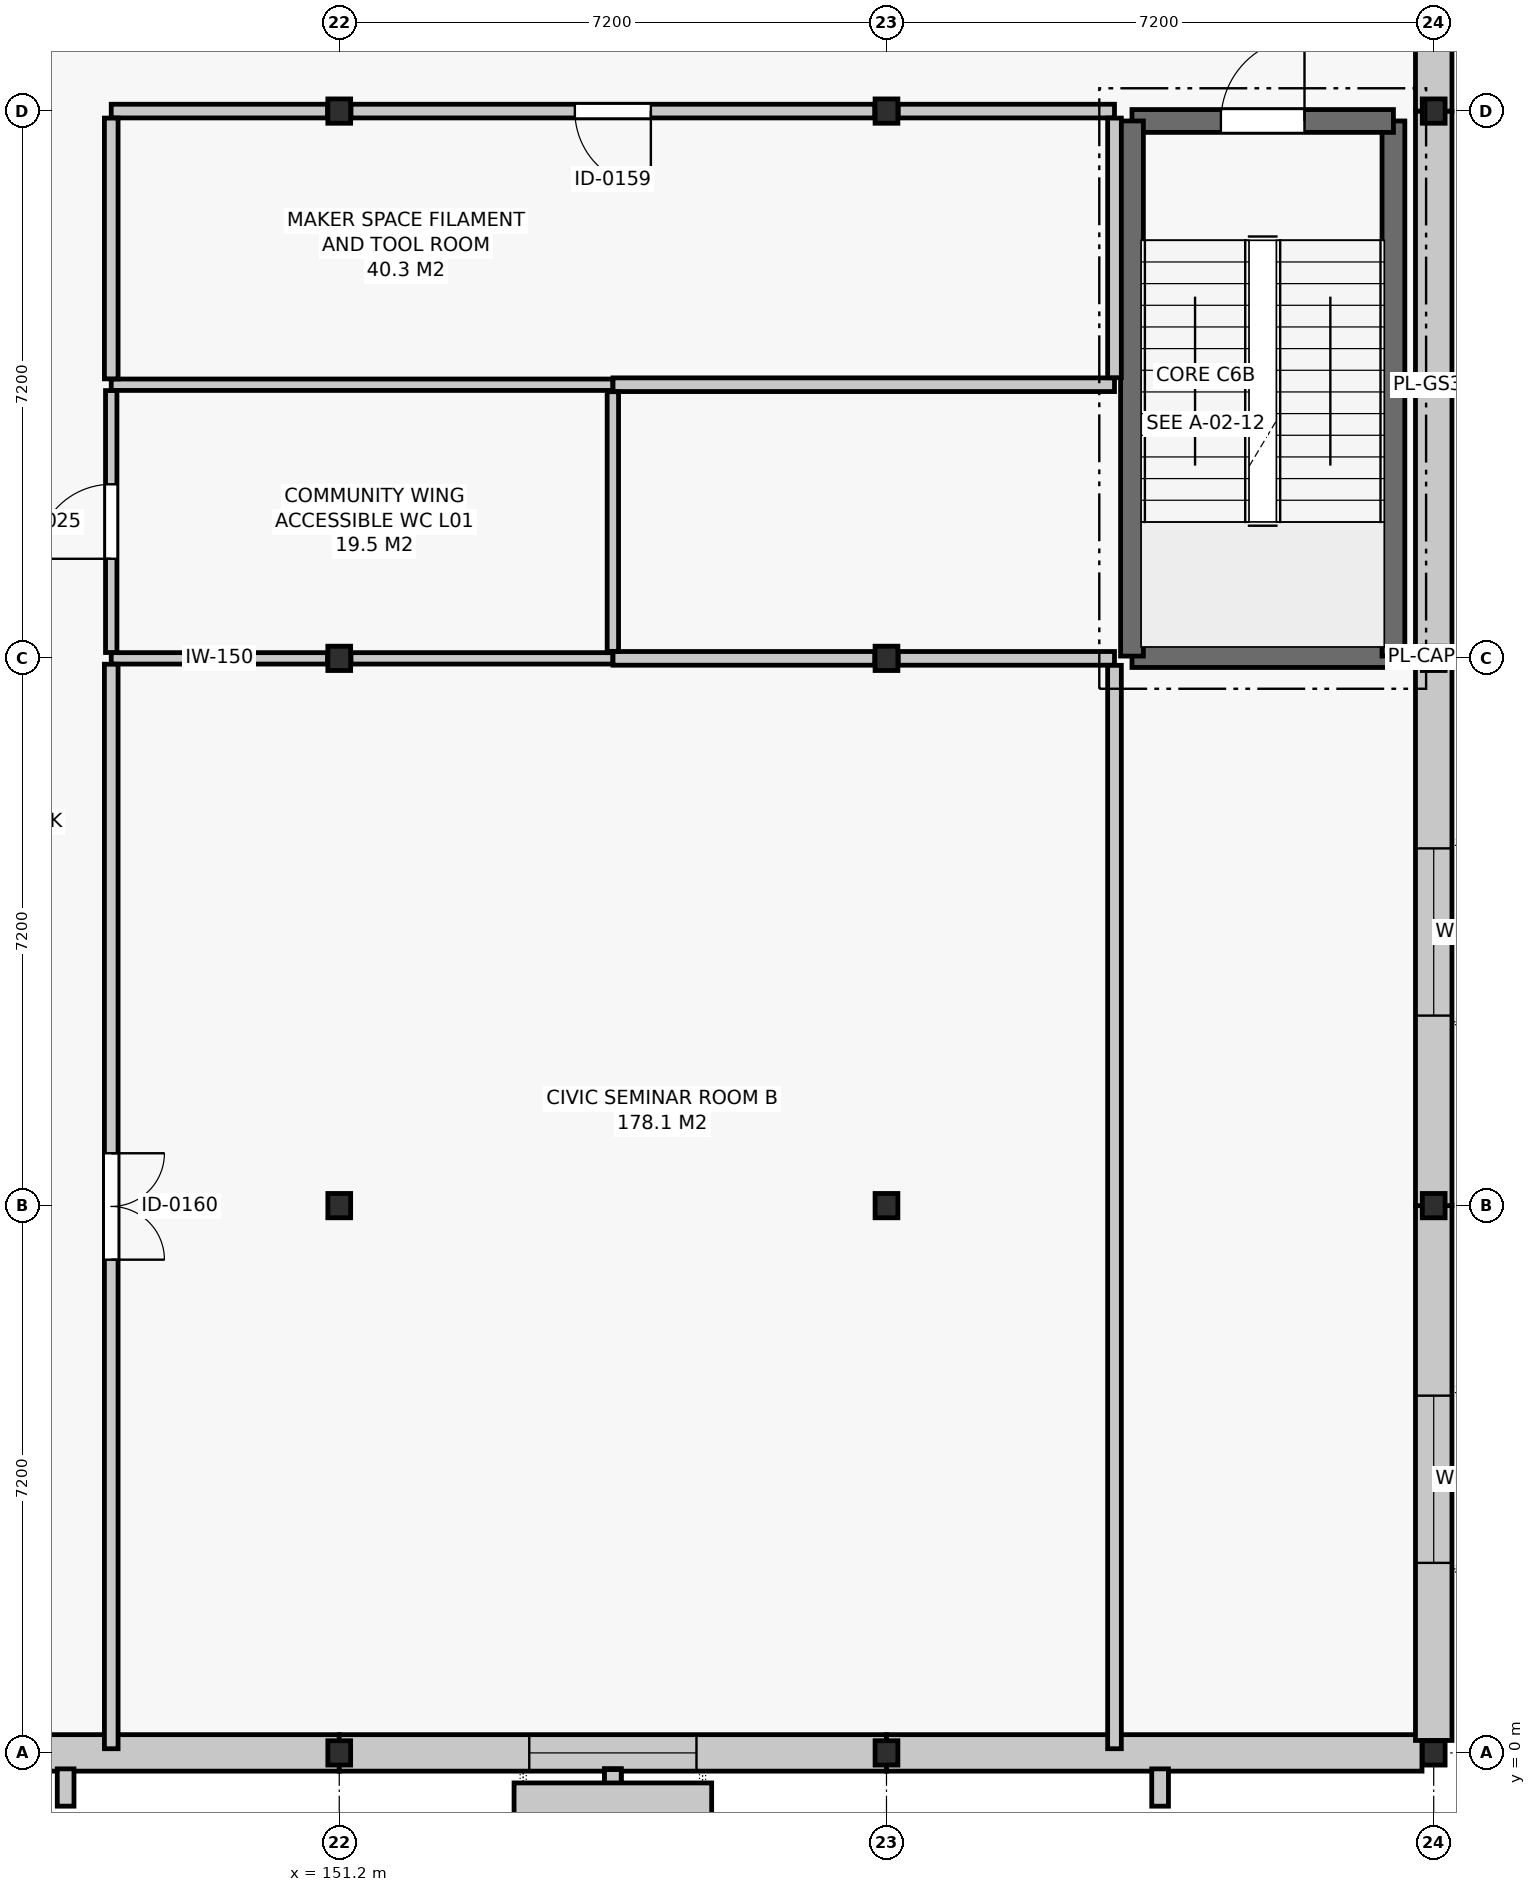
"""IFC4 building model, lengths in metres.
Left out: names, types, materials, properties, quantities, classifications, styles, units other than length and angle.
Written with IfcOpenShell. Run it as: python <this file> out.ifc"""

import sys

from ifc_helpers import new_model, si_unit, direction, frame, frame_2d, origin, origin_2d, place, context, subcontext, project, spatial, rectangle, i_section, extrude, element, fill, save


model = new_model("IFC4")
c1 = context("Model", 3, precision=1e-05, world=origin(), true_north=direction((0.0, 1.0)))
c2 = subcontext(c1, "Body", "Model", "MODEL_VIEW")
j1 = project(units=[si_unit("LENGTHUNIT", "METRE"), si_unit("PLANEANGLEUNIT", "RADIAN")], contexts=[c1])
p1 = place(None, origin())
s1 = spatial("IfcSite", under=j1, at=p1, CompositionType="ELEMENT")
p2 = place(p1, origin())
s2 = spatial("IfcBuilding", under=s1, at=p2, CompositionType="ELEMENT")
p3 = place(p2, frame((0.0, 0.0, 5.4)))
s3 = spatial("IfcBuildingStorey", under=s2, at=p3, CompositionType="ELEMENT", Elevation=5.4)
for number, where, z_axis, x_axis in (
    (1, (151.2, 0.0, 0.0), (0.0, 0.0, 1.0), (1.0, 0.0, 0.0)),
    (2, (151.2, 7.2, 0.0), (0.0, 0.0, 1.0), (1.0, 0.0, 0.0)),
    (3, (151.2, 14.4, 0.0), (0.0, 0.0, 1.0), (1.0, 0.0, 0.0)),
    (4, (151.2, 21.6, 0.0), (0.0, 0.0, 1.0), (1.0, 0.0, 0.0)),
    (5, (158.4, 0.0, 0.0), (0.0, 0.0, 1.0), (1.0, 0.0, 0.0)),
    (6, (158.4, 7.2, 0.0), (0.0, 0.0, 1.0), (1.0, 0.0, 0.0)),
    (7, (158.4, 14.4, 0.0), (0.0, 0.0, 1.0), (1.0, 0.0, 0.0)),
    (8, (158.4, 21.6, 0.0), (0.0, 0.0, 1.0), (1.0, 0.0, 0.0)),
    (9, (165.6, 0.0, 0.0), (0.0, 0.0, 1.0), (1.0, 0.0, 0.0)),
    (10, (165.6, 7.2, 0.0), (0.0, 0.0, 1.0), (1.0, 0.0, 0.0)),
    (11, (165.6, 14.4, 0.0), (0.0, 0.0, 1.0), (1.0, 0.0, 0.0)),
    (12, (165.6, 21.6, 0.0), (0.0, 0.0, 1.0), (1.0, 0.0, 0.0)),
):
    element("IfcColumn", number, at=place(p3, frame(where, z_axis=z_axis, x_axis=x_axis)), inside=s3, PredefinedType="COLUMN", context=c2, shape_type="SweptSolid", body=[
        extrude(i_section(OverallWidth=0.3, OverallDepth=0.32, WebThickness=0.011, FlangeThickness=0.021, FilletRadius=0.027, at=origin_2d()), origin(), (0.0, 0.0, 1.0), 4.8),
    ])
p4 = place(p3, frame((144.0, 0.0, 0.0), z_axis=(0.0, 0.0, 1.0), x_axis=(1.0, 0.0, 0.0)))
e13 = element("IfcWall", 13, at=p4, inside=s3, PredefinedType="SOLIDWALL", context=c2, shape_type="SweptSolid", body=[
    extrude(rectangle(XDim=7.2, YDim=0.48, at=frame_2d((3.6, 0.0))), origin(), (0.0, 0.0, 1.0), 3.8),
])
p5 = place(p3, frame((151.2, 0.0, 0.0), z_axis=(0.0, 0.0, 1.0), x_axis=(1.0, 0.0, 0.0)))
e14 = element("IfcWall", 14, at=p5, inside=s3, PredefinedType="SOLIDWALL", context=c2, shape_type="SweptSolid", body=[
    extrude(rectangle(XDim=7.2, YDim=0.48, at=frame_2d((3.6, 0.0))), origin(), (0.0, 0.0, 1.0), 3.8),
])
p6 = place(p5, frame((2.5, 0.0, 0.9)))
e15 = element("IfcOpeningElement", 15, at=p6, cuts=e14, PredefinedType="OPENING", context=c2, shape_type="SweptSolid", body=[
    extrude(rectangle(XDim=2.2, YDim=2.25, at=frame_2d((1.1, 1.125))), frame((0.0, 0.252, 0.0), z_axis=(0.0, -1.0, 0.0), x_axis=(1.0, 0.0, 0.0)), (0.0, 0.0, 1.0), 0.504),
])
p7 = place(p3, frame((158.4, 0.0, 0.0), z_axis=(0.0, 0.0, 1.0), x_axis=(1.0, 0.0, 0.0)))
e16 = element("IfcWall", 16, at=p7, inside=s3, PredefinedType="SOLIDWALL", context=c2, shape_type="SweptSolid", body=[
    extrude(rectangle(XDim=7.046, YDim=0.48, at=frame_2d((3.523, 0.0))), origin(), (0.0, 0.0, 1.0), 3.8),
])
p8 = place(p3, frame((165.6, 0.164, 0.0), z_axis=(0.0, 0.0, 1.0), x_axis=(0.0, 1.0, 0.0)))
e17 = element("IfcWall", 17, at=p8, inside=s3, PredefinedType="SOLIDWALL", context=c2, shape_type="SweptSolid", body=[
    extrude(rectangle(XDim=7.036, YDim=0.48, at=frame_2d((3.518, 0.0))), origin(), (0.0, 0.0, 1.0), 3.8),
])
p9 = place(p8, frame((2.336, 0.0, 0.9)))
e18 = element("IfcOpeningElement", 18, at=p9, cuts=e17, PredefinedType="OPENING", context=c2, shape_type="SweptSolid", body=[
    extrude(rectangle(XDim=2.2, YDim=2.25, at=frame_2d((1.1, 1.125))), frame((0.0, 0.252, 0.0), z_axis=(0.0, -1.0, 0.0), x_axis=(1.0, 0.0, 0.0)), (0.0, 0.0, 1.0), 0.504),
])
p10 = place(p3, frame((165.6, 7.2, 0.0), z_axis=(0.0, 0.0, 1.0), x_axis=(0.0, 1.0, 0.0)))
e19 = element("IfcWall", 19, at=p10, inside=s3, PredefinedType="SOLIDWALL", context=c2, shape_type="SweptSolid", body=[
    extrude(rectangle(XDim=7.2, YDim=0.48, at=frame_2d((3.6, 0.0))), origin(), (0.0, 0.0, 1.0), 3.8),
])
p11 = place(p10, frame((2.5, 0.0, 0.9)))
e20 = element("IfcOpeningElement", 20, at=p11, cuts=e19, PredefinedType="OPENING", context=c2, shape_type="SweptSolid", body=[
    extrude(rectangle(XDim=2.2, YDim=2.25, at=frame_2d((1.1, 1.125))), frame((0.0, 0.252, 0.0), z_axis=(0.0, -1.0, 0.0), x_axis=(1.0, 0.0, 0.0)), (0.0, 0.0, 1.0), 0.504),
])
p12 = place(p3, frame((165.6, 14.4, 0.0), z_axis=(0.0, 0.0, 1.0), x_axis=(0.0, 1.0, 0.0)))
e21 = element("IfcWall", 21, at=p12, inside=s3, PredefinedType="SOLIDWALL", context=c2, shape_type="SweptSolid", body=[
    extrude(rectangle(XDim=7.2, YDim=0.48, at=frame_2d((3.6, 0.0))), origin(), (0.0, 0.0, 1.0), 3.8),
])
p13 = place(p3, frame((165.6, 21.6, 0.0), z_axis=(0.0, 0.0, 1.0), x_axis=(0.0, 1.0, 0.0)))
e22 = element("IfcWall", 22, at=p13, inside=s3, PredefinedType="SOLIDWALL", context=c2, shape_type="SweptSolid", body=[
    extrude(rectangle(XDim=7.2, YDim=0.48, at=frame_2d((3.6, 0.0))), origin(), (0.0, 0.0, 1.0), 3.8),
])
p14 = place(p13, frame((2.5, 0.0, 0.9)))
e23 = element("IfcOpeningElement", 23, at=p14, cuts=e22, PredefinedType="OPENING", context=c2, shape_type="SweptSolid", body=[
    extrude(rectangle(XDim=2.2, YDim=2.25, at=frame_2d((1.1, 1.125))), frame((0.0, 0.252, 0.0), z_axis=(0.0, -1.0, 0.0), x_axis=(1.0, 0.0, 0.0)), (0.0, 0.0, 1.0), 0.504),
])
p15 = place(p3, frame((161.63, 14.43, 0.0), z_axis=(0.0, 0.0, 1.0), x_axis=(1.0, 0.0, 0.0)))
e24 = element("IfcWall", 24, at=p15, inside=s3, PredefinedType="SHEAR", context=c2, shape_type="SweptSolid", body=[
    extrude(rectangle(XDim=3.44, YDim=0.3, at=frame_2d((1.72, 0.0))), origin(), (0.0, 0.0, 1.0), 4.52),
])
p16 = place(p3, frame((165.07, 14.43, 0.0), z_axis=(0.0, 0.0, 1.0), x_axis=(0.0, 1.0, 0.0)))
e25 = element("IfcWall", 25, at=p16, inside=s3, PredefinedType="SHEAR", context=c2, shape_type="SweptSolid", body=[
    extrude(rectangle(XDim=7.04, YDim=0.3, at=frame_2d((3.52, 0.0))), origin(), (0.0, 0.0, 1.0), 4.52),
])
p17 = place(p3, frame((165.07, 21.47, 0.0), z_axis=(0.0, 0.0, 1.0), x_axis=(-1.0, 0.0, 0.0)))
e26 = element("IfcWall", 26, at=p17, inside=s3, PredefinedType="SHEAR", context=c2, shape_type="SweptSolid", body=[
    extrude(rectangle(XDim=3.44, YDim=0.3, at=frame_2d((1.72, 0.0))), origin(), (0.0, 0.0, 1.0), 4.52),
])
p18 = place(p17, frame((1.17, 0.0, 0.0)))
e27 = element("IfcOpeningElement", 27, at=p18, cuts=e26, PredefinedType="OPENING", context=c2, shape_type="SweptSolid", body=[
    extrude(rectangle(XDim=1.1, YDim=2.15, at=frame_2d((0.55, 1.075))), frame((0.0, 0.162, 0.0), z_axis=(0.0, -1.0, 0.0), x_axis=(1.0, 0.0, 0.0)), (0.0, 0.0, 1.0), 0.324),
])
p19 = place(p3, frame((161.63, 21.47, 0.0), z_axis=(0.0, 0.0, 1.0), x_axis=(0.0, -1.0, 0.0)))
e28 = element("IfcWall", 28, at=p19, inside=s3, PredefinedType="SHEAR", context=c2, shape_type="SweptSolid", body=[
    extrude(rectangle(XDim=7.04, YDim=0.3, at=frame_2d((3.52, 0.0))), origin(), (0.0, 0.0, 1.0), 4.52),
])
p20 = place(p3, frame((148.2, 14.4, 0.0), z_axis=(0.0, 0.0, 1.0), x_axis=(1.0, 0.0, 0.0)))
e29 = element("IfcWall", 29, at=p20, inside=s3, PredefinedType="PARTITIONING", context=c2, shape_type="SweptSolid", body=[
    extrude(rectangle(XDim=2.846, YDim=0.15, at=frame_2d((1.423, 0.0))), origin(), (0.0, 0.0, 1.0), 4.115),
])
p21 = place(p3, frame((151.354, 14.4, 0.0), z_axis=(0.0, 0.0, 1.0), x_axis=(1.0, 0.0, 0.0)))
e30 = element("IfcWall", 30, at=p21, inside=s3, PredefinedType="PARTITIONING", context=c2, shape_type="SweptSolid", body=[
    extrude(rectangle(XDim=3.446, YDim=0.15, at=frame_2d((1.723, 0.0))), origin(), (0.0, 0.0, 1.0), 4.115),
])
p22 = place(p3, frame((148.2, 18.0, 0.0), z_axis=(0.0, 0.0, 1.0), x_axis=(1.0, 0.0, 0.0)))
e31 = element("IfcWall", 31, at=p22, inside=s3, PredefinedType="PARTITIONING", context=c2, shape_type="SweptSolid", body=[
    extrude(rectangle(XDim=6.6, YDim=0.15, at=frame_2d((3.3, 0.0))), origin(), (0.0, 0.0, 1.0), 4.065),
])
p23 = place(p3, frame((154.802, 18.0, 0.0), z_axis=(0.0, 0.0, 1.0), x_axis=(1.0, 0.0, 0.0)))
e32 = element("IfcWall", 32, at=p23, inside=s3, PredefinedType="PARTITIONING", context=c2, shape_type="SweptSolid", body=[
    extrude(rectangle(XDim=6.598, YDim=0.18, at=frame_2d((3.299, 0.0))), origin(), (0.0, 0.0, 1.0), 4.065),
])
p24 = place(p3, frame((148.2, 21.6, 0.0), z_axis=(0.0, 0.0, 1.0), x_axis=(1.0, 0.0, 0.0)))
e33 = element("IfcWall", 33, at=p24, inside=s3, PredefinedType="PARTITIONING", context=c2, shape_type="SweptSolid", body=[
    extrude(rectangle(XDim=2.846, YDim=0.18, at=frame_2d((1.423, 0.0))), origin(), (0.0, 0.0, 1.0), 4.115),
])
p25 = place(p3, frame((151.354, 21.6, 0.0), z_axis=(0.0, 0.0, 1.0), x_axis=(1.0, 0.0, 0.0)))
e34 = element("IfcWall", 34, at=p25, inside=s3, PredefinedType="PARTITIONING", context=c2, shape_type="SweptSolid", body=[
    extrude(rectangle(XDim=6.892, YDim=0.18, at=frame_2d((3.446, 0.0))), origin(), (0.0, 0.0, 1.0), 4.115),
])
p26 = place(p25, frame((2.946, 0.0, 0.0)))
e35 = element("IfcOpeningElement", 35, at=p26, cuts=e34, PredefinedType="OPENING", context=c2, shape_type="SweptSolid", body=[
    extrude(rectangle(XDim=1.0, YDim=2.15, at=frame_2d((0.5, 1.075))), frame((0.0, 0.102, 0.0), z_axis=(0.0, -1.0, 0.0), x_axis=(1.0, 0.0, 0.0)), (0.0, 0.0, 1.0), 0.204),
])
p27 = place(p3, frame((158.554, 21.6, 0.0), z_axis=(0.0, 0.0, 1.0), x_axis=(1.0, 0.0, 0.0)))
e36 = element("IfcWall", 36, at=p27, inside=s3, PredefinedType="PARTITIONING", context=c2, shape_type="SweptSolid", body=[
    extrude(rectangle(XDim=2.846, YDim=0.18, at=frame_2d((1.423, 0.0))), origin(), (0.0, 0.0, 1.0), 4.115),
])
p28 = place(p3, frame((154.802, 14.4, 0.0), z_axis=(0.0, 0.0, 1.0), x_axis=(1.0, 0.0, 0.0)))
e37 = element("IfcWall", 37, at=p28, inside=s3, PredefinedType="PARTITIONING", context=c2, shape_type="SweptSolid", body=[
    extrude(rectangle(XDim=3.444, YDim=0.18, at=frame_2d((1.722, 0.0))), origin(), (0.0, 0.0, 1.0), 4.115),
])
p29 = place(p3, frame((158.554, 14.4, 0.0), z_axis=(0.0, 0.0, 1.0), x_axis=(1.0, 0.0, 0.0)))
e38 = element("IfcWall", 38, at=p29, inside=s3, PredefinedType="PARTITIONING", context=c2, shape_type="SweptSolid", body=[
    extrude(rectangle(XDim=2.846, YDim=0.18, at=frame_2d((1.423, 0.0))), origin(), (0.0, 0.0, 1.0), 4.115),
])
p30 = place(p3, frame((148.2, 14.477, 0.0), z_axis=(0.0, 0.0, 1.0), x_axis=(0.0, 1.0, 0.0)))
e39 = element("IfcWall", 39, at=p30, inside=s3, PredefinedType="PARTITIONING", context=c2, shape_type="SweptSolid", body=[
    extrude(rectangle(XDim=3.446, YDim=0.15, at=frame_2d((1.723, 0.0))), origin(), (0.0, 0.0, 1.0), 4.115),
])
p31 = place(p30, frame((1.233, 0.0, 0.0)))
e40 = element("IfcOpeningElement", 40, at=p31, cuts=e39, PredefinedType="OPENING", context=c2, shape_type="SweptSolid", body=[
    extrude(rectangle(XDim=0.98, YDim=2.1, at=frame_2d((0.49, 1.05))), frame((0.0, 0.087, 0.0), z_axis=(0.0, -1.0, 0.0), x_axis=(1.0, 0.0, 0.0)), (0.0, 0.0, 1.0), 0.174),
])
p32 = place(p3, frame((154.8, 14.492, 0.0), z_axis=(0.0, 0.0, 1.0), x_axis=(0.0, 1.0, 0.0)))
e41 = element("IfcWall", 41, at=p32, inside=s3, PredefinedType="PARTITIONING", context=c2, shape_type="SweptSolid", body=[
    extrude(rectangle(XDim=3.416, YDim=0.15, at=frame_2d((1.708, 0.0))), origin(), (0.0, 0.0, 1.0), 4.115),
])
p33 = place(p3, frame((148.2, 18.077, 0.0), z_axis=(0.0, 0.0, 1.0), x_axis=(0.0, 1.0, 0.0)))
e42 = element("IfcWall", 42, at=p33, inside=s3, PredefinedType="PARTITIONING", context=c2, shape_type="SweptSolid", body=[
    extrude(rectangle(XDim=3.431, YDim=0.18, at=frame_2d((1.716, 0.0))), origin(), (0.0, 0.0, 1.0), 4.115),
])
p34 = place(p3, frame((161.4, 18.092, 0.0), z_axis=(0.0, 0.0, 1.0), x_axis=(0.0, 1.0, 0.0)))
e43 = element("IfcWall", 43, at=p34, inside=s3, PredefinedType="PARTITIONING", context=c2, shape_type="SweptSolid", body=[
    extrude(rectangle(XDim=3.416, YDim=0.18, at=frame_2d((1.708, 0.0))), origin(), (0.0, 0.0, 1.0), 4.115),
])
p35 = place(p3, frame((148.2, 0.055, 0.0), z_axis=(0.0, 0.0, 1.0), x_axis=(0.0, 1.0, 0.0)))
e44 = element("IfcWall", 44, at=p35, inside=s3, PredefinedType="PARTITIONING", context=c2, shape_type="SweptSolid", body=[
    extrude(rectangle(XDim=14.268, YDim=0.18, at=frame_2d((7.134, 0.0))), origin(), (0.0, 0.0, 1.0), 3.955),
])
p36 = place(p35, frame((6.434, 0.0, 0.0)))
e45 = element("IfcOpeningElement", 45, at=p36, cuts=e44, PredefinedType="OPENING", context=c2, shape_type="SweptSolid", body=[
    extrude(rectangle(XDim=1.4, YDim=2.2, at=frame_2d((0.7, 1.1))), frame((0.0, 0.102, 0.0), z_axis=(0.0, -1.0, 0.0), x_axis=(1.0, 0.0, 0.0)), (0.0, 0.0, 1.0), 0.204),
])
p37 = place(p3, frame((161.4, 0.055, 0.0), z_axis=(0.0, 0.0, 1.0), x_axis=(0.0, 1.0, 0.0)))
e46 = element("IfcWall", 46, at=p37, inside=s3, PredefinedType="PARTITIONING", context=c2, shape_type="SweptSolid", body=[
    extrude(rectangle(XDim=14.253, YDim=0.18, at=frame_2d((7.126, 0.0))), origin(), (0.0, 0.0, 1.0), 3.955),
])
p38 = place(p6, origin())
e47 = element("IfcWindow", 47, at=p38, inside=s3, PartitioningType="SINGLE_PANEL", PredefinedType="WINDOW", context=c2, shape_type="SweptSolid", body=[
    extrude(rectangle(XDim=2.2, YDim=2.25, at=frame_2d((1.1, 1.125))), frame((0.0, 0.03, 0.0), z_axis=(0.0, -1.0, 0.0), x_axis=(1.0, 0.0, 0.0)), (0.0, 0.0, 1.0), 0.06),
])
fill(e15, e47)
p39 = place(p9, origin())
e48 = element("IfcWindow", 48, at=p39, inside=s3, PartitioningType="SINGLE_PANEL", PredefinedType="WINDOW", context=c2, shape_type="SweptSolid", body=[
    extrude(rectangle(XDim=2.2, YDim=2.25, at=frame_2d((1.1, 1.125))), frame((0.0, 0.03, 0.0), z_axis=(0.0, -1.0, 0.0), x_axis=(1.0, 0.0, 0.0)), (0.0, 0.0, 1.0), 0.06),
])
fill(e18, e48)
p40 = place(p11, origin())
e49 = element("IfcWindow", 49, at=p40, inside=s3, PartitioningType="SINGLE_PANEL", PredefinedType="WINDOW", context=c2, shape_type="SweptSolid", body=[
    extrude(rectangle(XDim=2.2, YDim=2.25, at=frame_2d((1.1, 1.125))), frame((0.0, 0.03, 0.0), z_axis=(0.0, -1.0, 0.0), x_axis=(1.0, 0.0, 0.0)), (0.0, 0.0, 1.0), 0.06),
])
fill(e20, e49)
p41 = place(p18, frame((1.1, 0.0, 0.0), z_axis=(0.0, 0.0, 1.0), x_axis=(-1.0, 0.0, 0.0)))
e50 = element("IfcDoor", 50, at=p41, inside=s3, OperationType="SINGLE_SWING_RIGHT", PredefinedType="DOOR", context=c2, shape_type="SweptSolid", body=[
    extrude(rectangle(XDim=1.1, YDim=2.15, at=frame_2d((0.55, 1.075))), frame((0.0, 0.025, 0.0), z_axis=(0.0, -1.0, 0.0), x_axis=(1.0, 0.0, 0.0)), (0.0, 0.0, 1.0), 0.05),
])
fill(e27, e50)
p42 = place(p31, origin())
e51 = element("IfcDoor", 51, at=p42, inside=s3, OperationType="SINGLE_SWING_LEFT", PredefinedType="DOOR", context=c2, shape_type="SweptSolid", body=[
    extrude(rectangle(XDim=0.98, YDim=2.1, at=frame_2d((0.49, 1.05))), frame((0.0, 0.025, 0.0), z_axis=(0.0, -1.0, 0.0), x_axis=(1.0, 0.0, 0.0)), (0.0, 0.0, 1.0), 0.05),
])
fill(e40, e51)
p43 = place(p26, frame((1.0, 0.0, 0.0), z_axis=(0.0, 0.0, 1.0), x_axis=(-1.0, 0.0, 0.0)))
e52 = element("IfcDoor", 52, at=p43, inside=s3, OperationType="SINGLE_SWING_LEFT", PredefinedType="DOOR", context=c2, shape_type="SweptSolid", body=[
    extrude(rectangle(XDim=1.0, YDim=2.15, at=frame_2d((0.5, 1.075))), frame((0.0, 0.025, 0.0), z_axis=(0.0, -1.0, 0.0), x_axis=(1.0, 0.0, 0.0)), (0.0, 0.0, 1.0), 0.05),
])
fill(e35, e52)
p44 = place(p36, frame((1.4, 0.0, 0.0), z_axis=(0.0, 0.0, 1.0), x_axis=(-1.0, 0.0, 0.0)))
e53 = element("IfcDoor", 53, at=p44, inside=s3, OperationType="DOUBLE_DOOR_SINGLE_SWING", PredefinedType="DOOR", context=c2, shape_type="SweptSolid", body=[
    extrude(rectangle(XDim=1.4, YDim=2.2, at=frame_2d((0.7, 1.1))), frame((0.0, 0.025, 0.0), z_axis=(0.0, -1.0, 0.0), x_axis=(1.0, 0.0, 0.0)), (0.0, 0.0, 1.0), 0.05),
])
fill(e45, e53)
save(model, sys.argv[1])
